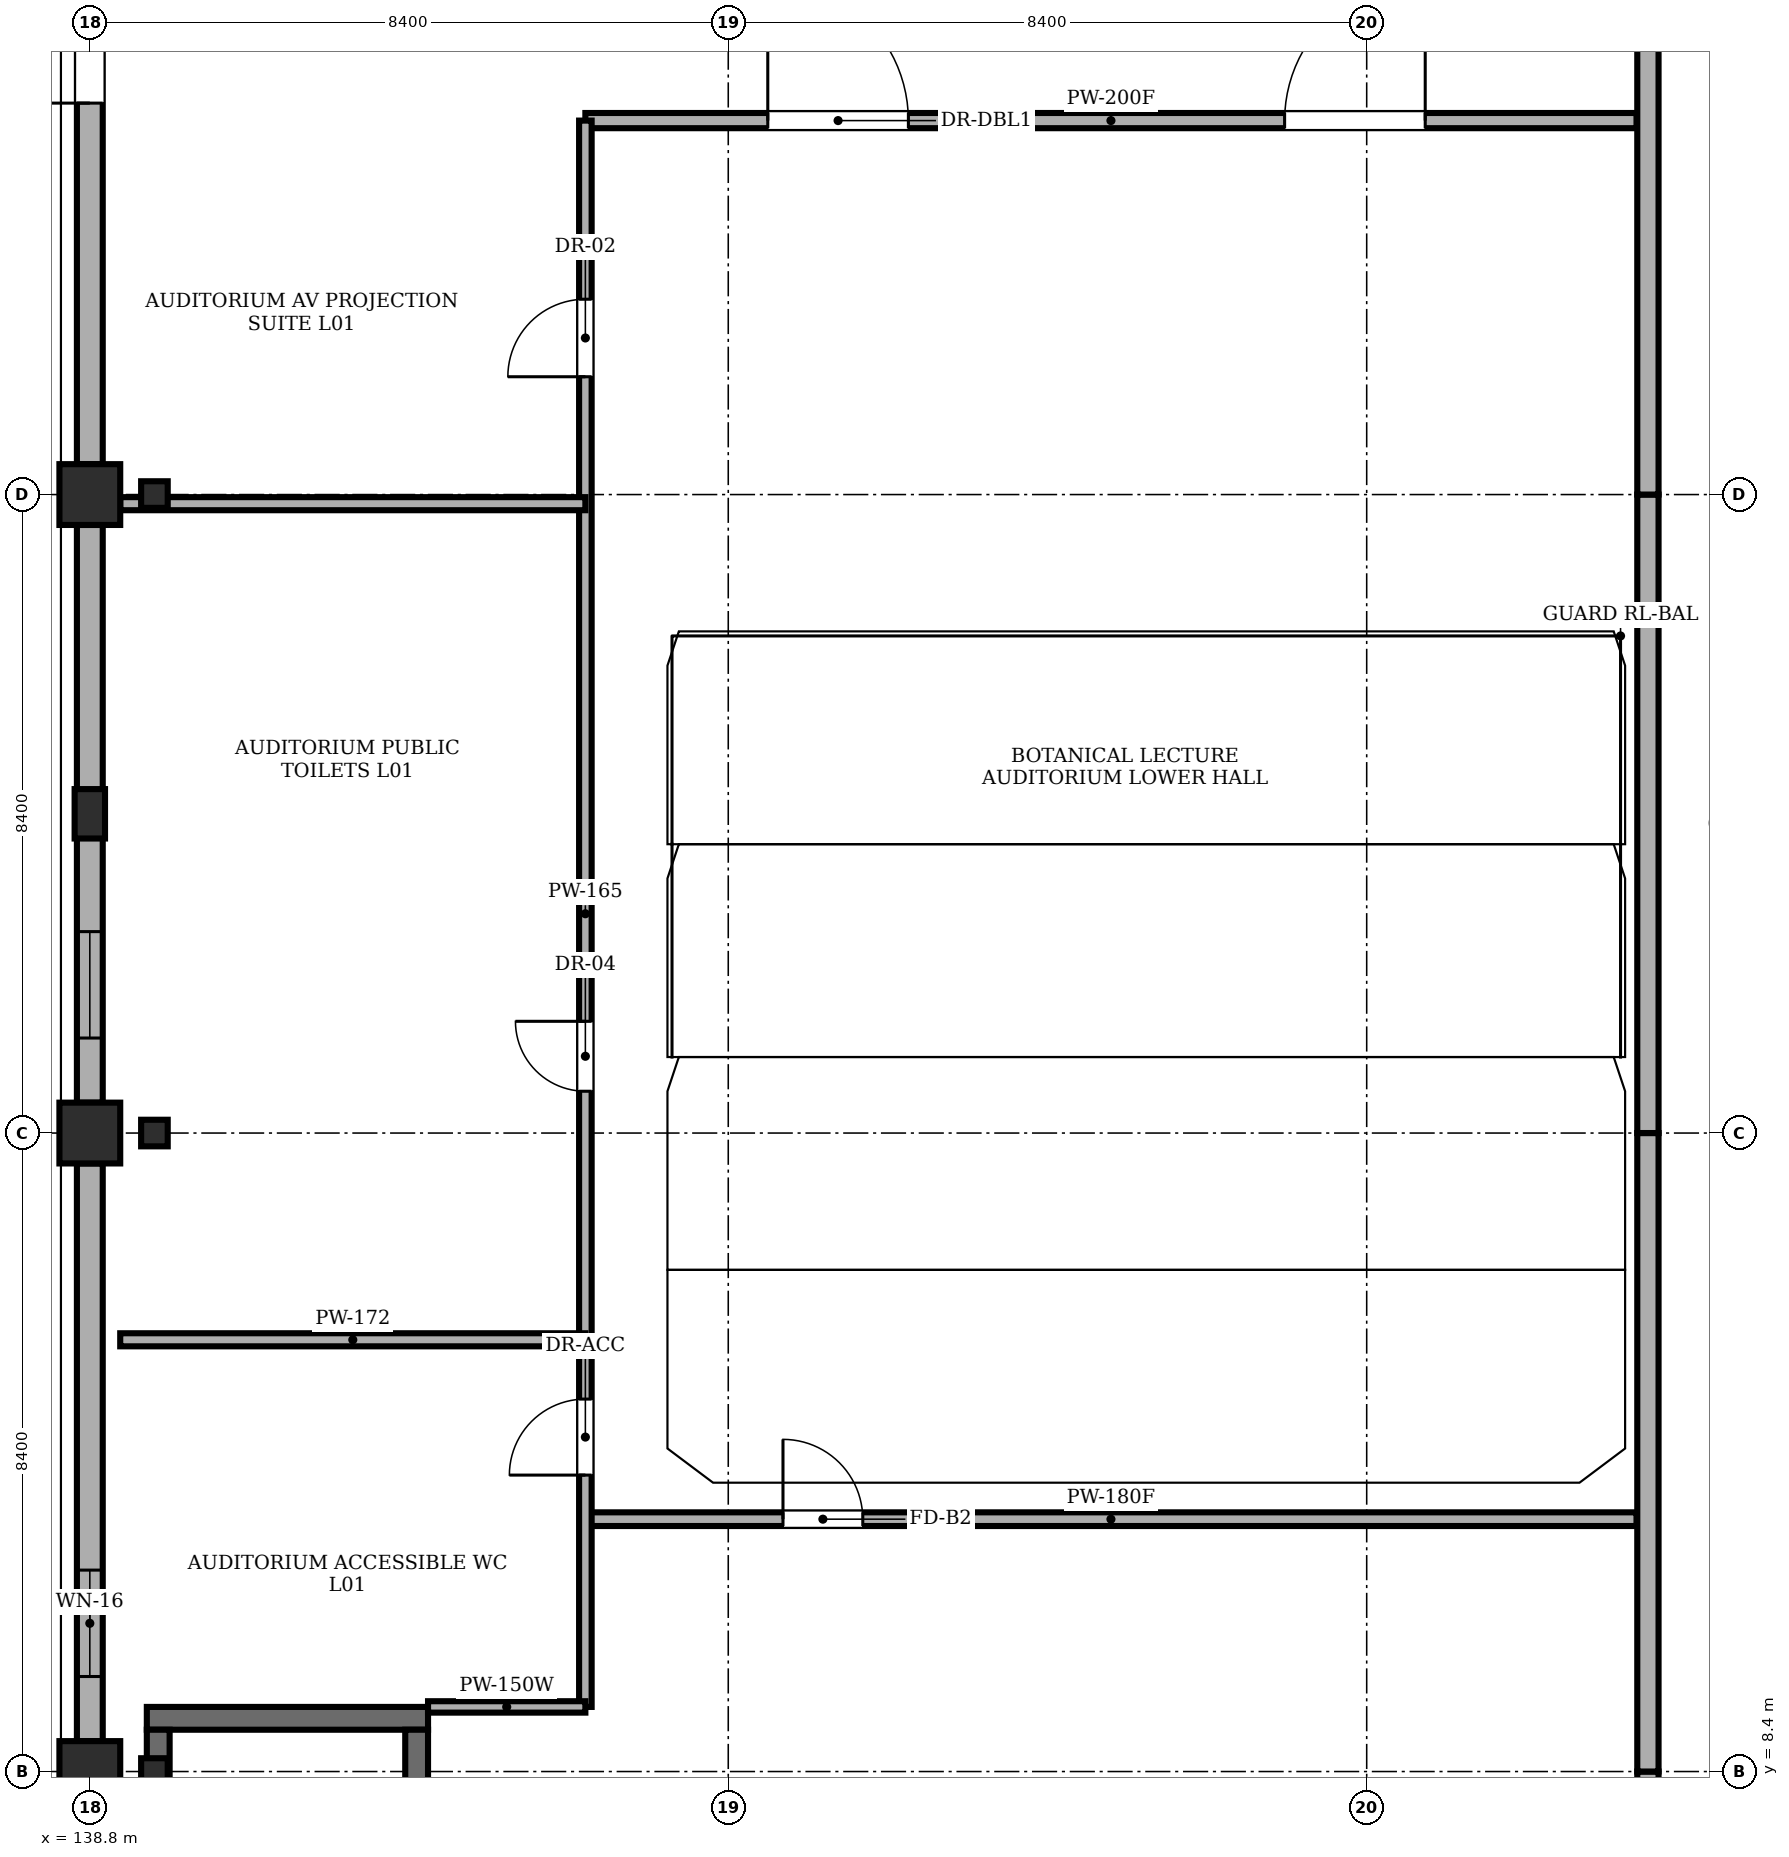
"""IFC4 building model, lengths in metres.
Left out: names, types, materials, properties, quantities, classifications, styles, units other than length and angle.
Written with IfcOpenShell. Run it as: python <this file> out.ifc"""

import sys

from ifc_helpers import new_model, si_unit, direction, frame, frame_2d, origin, origin_2d, place, context, subcontext, project, spatial, rectangle, i_section, extrude, element, fill, save


model = new_model("IFC4")
c1 = context("Model", 3, precision=1e-05, world=origin(), true_north=direction((0.0, 1.0)))
c2 = subcontext(c1, "Body", "Model", "MODEL_VIEW")
j1 = project(units=[si_unit("LENGTHUNIT", "METRE"), si_unit("PLANEANGLEUNIT", "RADIAN")], contexts=[c1])
p1 = place(None, origin())
s1 = spatial("IfcSite", under=j1, at=p1, CompositionType="ELEMENT")
p2 = place(p1, origin())
s2 = spatial("IfcBuilding", under=s1, at=p2, CompositionType="ELEMENT")
p3 = place(p2, origin())
s3 = spatial("IfcBuildingStorey", under=s2, at=p3, CompositionType="ELEMENT", Elevation=0.0)
for number, where, z_axis, x_axis in (
    (1, (138.8, 8.4, 0.0), (0.0, 0.0, 1.0), (1.0, 0.0, 0.0)),
    (2, (138.8, 16.8, 0.0), (0.0, 0.0, 1.0), (1.0, 0.0, 0.0)),
    (3, (138.8, 25.2, 0.0), (0.0, 0.0, 1.0), (1.0, 0.0, 0.0)),
):
    element("IfcColumn", number, at=place(p3, frame(where, z_axis=z_axis, x_axis=x_axis)), inside=s3, PredefinedType="COLUMN", context=c2, shape_type="SweptSolid", body=[
        extrude(rectangle(XDim=0.8, YDim=0.8, at=origin_2d()), origin(), (0.0, 0.0, 1.0), 5.18),
    ])
p4 = place(p3, frame((138.8, 21.0, 0.0), z_axis=(0.0, 0.0, 1.0), x_axis=(1.0, 0.0, 0.0)))
e4 = element("IfcColumn", 4, at=p4, inside=s3, PredefinedType="PILASTER", context=c2, shape_type="SweptSolid", body=[
    extrude(rectangle(XDim=0.4, YDim=0.65, at=origin_2d()), origin(), (0.0, 0.0, 1.0), 5.18),
])
p5 = place(p3, frame((139.55, 9.1, 0.0), z_axis=(0.0, 0.0, 1.0), x_axis=(1.0, 0.0, 0.0)))
e5 = element("IfcWall", 5, at=p5, inside=s3, PredefinedType="SHEAR", context=c2, shape_type="SweptSolid", body=[
    extrude(rectangle(XDim=3.7, YDim=0.3, at=frame_2d((1.85, 0.0))), origin(), (0.0, 0.0, 1.0), 5.18),
])
p6 = place(p3, frame((139.7, 1.05, 0.0), z_axis=(0.0, 0.0, 1.0), x_axis=(0.0, 1.0, 0.0)))
e6 = element("IfcWall", 6, at=p6, inside=s3, PredefinedType="SHEAR", context=c2, shape_type="SweptSolid", body=[
    extrude(rectangle(XDim=7.9, YDim=0.3, at=frame_2d((3.95, 0.0))), origin(), (0.0, 0.0, 1.0), 5.18),
])
p7 = place(p3, frame((143.1, 1.05, 0.0), z_axis=(0.0, 0.0, 1.0), x_axis=(0.0, 1.0, 0.0)))
e7 = element("IfcWall", 7, at=p7, inside=s3, PredefinedType="SHEAR", context=c2, shape_type="SweptSolid", body=[
    extrude(rectangle(XDim=7.9, YDim=0.3, at=frame_2d((3.95, 0.0))), origin(), (0.0, 0.0, 1.0), 5.18),
])
p8 = place(p7, frame((0.22, 0.0, 0.0)))
e8 = element("IfcOpeningElement", 8, at=p8, cuts=e7, PredefinedType="OPENING", context=c2, shape_type="SweptSolid", body=[
    extrude(rectangle(XDim=1.15, YDim=2.15, at=frame_2d((0.575, 1.075))), frame((0.0, 0.16, 0.0), z_axis=(0.0, -1.0, 0.0), x_axis=(1.0, 0.0, 0.0)), (0.0, 0.0, 1.0), 0.32),
])
p9 = place(p3, frame((139.65, 8.4, 0.0), z_axis=(0.0, 0.0, 1.0), x_axis=(1.0, 0.0, 0.0)))
e9 = element("IfcColumn", 9, at=p9, inside=s3, PredefinedType="COLUMN", context=c2, shape_type="SweptSolid", body=[
    extrude(i_section(OverallWidth=0.35, OverallDepth=0.35, WebThickness=0.012, FlangeThickness=0.019, at=origin_2d()), origin(), (0.0, 0.0, 1.0), 5.18),
])
for number, where, z_axis, x_axis in (
    (10, (139.65, 16.8, 0.0), (0.0, 0.0, 1.0), (1.0, 0.0, 0.0)),
    (11, (139.65, 25.2, 0.0), (0.0, 0.0, 1.0), (1.0, 0.0, 0.0)),
):
    element("IfcColumn", number, at=place(p3, frame(where, z_axis=z_axis, x_axis=x_axis)), inside=s3, PredefinedType="COLUMN", context=c2, shape_type="SweptSolid", body=[
        extrude(i_section(OverallWidth=0.35, OverallDepth=0.35, WebThickness=0.012, FlangeThickness=0.019, at=origin_2d()), origin(), (0.0, 0.0, 1.0), 5.4),
    ])
p10 = place(p3, frame((159.3, 8.4, 0.0), z_axis=(0.0, 0.0, 1.0), x_axis=(0.0, -1.0, 0.0)))
e12 = element("IfcWall", 12, at=p10, inside=s3, PredefinedType="STANDARD", context=c2, shape_type="SweptSolid", body=[
    extrude(rectangle(XDim=7.68, YDim=0.28, at=frame_2d((3.84, 0.0))), origin(), (0.0, 0.0, 1.0), 5.18),
])
p11 = place(p3, frame((159.3, 16.8, 0.0), z_axis=(0.0, 0.0, 1.0), x_axis=(0.0, -1.0, 0.0)))
e13 = element("IfcWall", 13, at=p11, inside=s3, PredefinedType="STANDARD", context=c2, shape_type="SweptSolid", body=[
    extrude(rectangle(XDim=8.4, YDim=0.28, at=frame_2d((4.2, 0.0))), origin(), (0.0, 0.0, 1.0), 5.18),
])
p12 = place(p3, frame((159.3, 25.2, 0.0), z_axis=(0.0, 0.0, 1.0), x_axis=(0.0, -1.0, 0.0)))
e14 = element("IfcWall", 14, at=p12, inside=s3, PredefinedType="STANDARD", context=c2, shape_type="SweptSolid", body=[
    extrude(rectangle(XDim=8.4, YDim=0.28, at=frame_2d((4.2, 0.0))), origin(), (0.0, 0.0, 1.0), 5.18),
])
p13 = place(p3, frame((159.3, 33.6, 0.0), z_axis=(0.0, 0.0, 1.0), x_axis=(0.0, -1.0, 0.0)))
e15 = element("IfcWall", 15, at=p13, inside=s3, PredefinedType="STANDARD", context=c2, shape_type="SweptSolid", body=[
    extrude(rectangle(XDim=8.4, YDim=0.28, at=frame_2d((4.2, 0.0))), origin(), (0.0, 0.0, 1.0), 5.18),
])
p14 = place(p3, frame((138.8, 8.8, 0.0), z_axis=(0.0, 0.0, 1.0), x_axis=(0.0, 1.0, 0.0)))
e16 = element("IfcWall", 16, at=p14, inside=s3, PredefinedType="STANDARD", context=c2, shape_type="SweptSolid", body=[
    extrude(rectangle(XDim=7.6, YDim=0.34, at=frame_2d((3.8, 0.0))), origin(), (0.0, 0.0, 1.0), 4.43),
])
p15 = place(p14, frame((0.85, 0.0, 1.6)))
e17 = element("IfcOpeningElement", 17, at=p15, cuts=e16, PredefinedType="OPENING", context=c2, shape_type="SweptSolid", body=[
    extrude(rectangle(XDim=1.4, YDim=1.4, at=frame_2d((0.7, 0.7))), frame((0.0, 0.18, 0.0), z_axis=(0.0, -1.0, 0.0), x_axis=(1.0, 0.0, 0.0)), (0.0, 0.0, 1.0), 0.36),
])
p16 = place(p3, frame((138.8, 17.2, 0.0), z_axis=(0.0, 0.0, 1.0), x_axis=(0.0, 1.0, 0.0)))
e18 = element("IfcWall", 18, at=p16, inside=s3, PredefinedType="STANDARD", context=c2, shape_type="SweptSolid", body=[
    extrude(rectangle(XDim=7.6, YDim=0.34, at=frame_2d((3.8, 0.0))), origin(), (0.0, 0.0, 1.0), 4.43),
])
p17 = place(p16, frame((0.85, 0.0, 1.6)))
e19 = element("IfcOpeningElement", 19, at=p17, cuts=e18, PredefinedType="OPENING", context=c2, shape_type="SweptSolid", body=[
    extrude(rectangle(XDim=1.4, YDim=1.4, at=frame_2d((0.7, 0.7))), frame((0.0, 0.18, 0.0), z_axis=(0.0, -1.0, 0.0), x_axis=(1.0, 0.0, 0.0)), (0.0, 0.0, 1.0), 0.36),
])
p18 = place(p3, frame((138.8, 25.6, 0.0), z_axis=(0.0, 0.0, 1.0), x_axis=(0.0, 1.0, 0.0)))
e20 = element("IfcWall", 20, at=p18, inside=s3, PredefinedType="STANDARD", context=c2, shape_type="SweptSolid", body=[
    extrude(rectangle(XDim=7.6, YDim=0.34, at=frame_2d((3.8, 0.0))), origin(), (0.0, 0.0, 1.0), 4.43),
])
p19 = place(p18, frame((4.75, 0.0, 0.0)))
e21 = element("IfcOpeningElement", 21, at=p19, cuts=e20, PredefinedType="OPENING", context=c2, shape_type="SweptSolid", body=[
    extrude(rectangle(XDim=1.8, YDim=2.3, at=frame_2d((0.9, 1.15))), frame((0.0, 0.18, 0.0), z_axis=(0.0, -1.0, 0.0), x_axis=(1.0, 0.0, 0.0)), (0.0, 0.0, 1.0), 0.36),
])
p20 = place(p3, frame((145.32, 30.12, 0.0), z_axis=(0.0, 0.0, 1.0), x_axis=(1.0, 0.0, 0.0)))
e22 = element("IfcWall", 22, at=p20, inside=s3, PredefinedType="SOLIDWALL", context=c2, shape_type="SweptSolid", body=[
    extrude(rectangle(XDim=13.83, YDim=0.2, at=frame_2d((6.915, 0.0))), origin(), (0.0, 0.0, 1.0), 5.18),
])
p21 = place(p20, frame((2.4, 0.0, 0.0)))
e23 = element("IfcOpeningElement", 23, at=p21, cuts=e22, PredefinedType="OPENING", context=c2, shape_type="SweptSolid", body=[
    extrude(rectangle(XDim=1.85, YDim=2.25, at=frame_2d((0.925, 1.125))), frame((0.0, 0.11, 0.0), z_axis=(0.0, -1.0, 0.0), x_axis=(1.0, 0.0, 0.0)), (0.0, 0.0, 1.0), 0.22),
])
p22 = place(p20, frame((9.2, 0.0, 0.0)))
e24 = element("IfcOpeningElement", 24, at=p22, cuts=e22, PredefinedType="OPENING", context=c2, shape_type="SweptSolid", body=[
    extrude(rectangle(XDim=1.85, YDim=2.25, at=frame_2d((0.925, 1.125))), frame((0.0, 0.11, 0.0), z_axis=(0.0, -1.0, 0.0), x_axis=(1.0, 0.0, 0.0)), (0.0, 0.0, 1.0), 0.22),
])
p23 = place(p3, frame((145.32, 11.72, 0.0), z_axis=(0.0, 0.0, 1.0), x_axis=(1.0, 0.0, 0.0)))
e25 = element("IfcWall", 25, at=p23, inside=s3, PredefinedType="STANDARD", context=c2, shape_type="SweptSolid", body=[
    extrude(rectangle(XDim=13.83, YDim=0.18, at=frame_2d((6.915, 0.0))), origin(), (0.0, 0.0, 1.0), 5.18),
])
p24 = place(p23, frame((2.6, 0.0, 0.0)))
e26 = element("IfcOpeningElement", 26, at=p24, cuts=e25, PredefinedType="OPENING", context=c2, shape_type="SweptSolid", body=[
    extrude(rectangle(XDim=1.05, YDim=2.15, at=frame_2d((0.525, 1.075))), frame((0.0, 0.1, 0.0), z_axis=(0.0, -1.0, 0.0), x_axis=(1.0, 0.0, 0.0)), (0.0, 0.0, 1.0), 0.2),
])
p25 = place(p3, frame((145.32, 9.25, 0.0), z_axis=(0.0, 0.0, 1.0), x_axis=(0.0, 1.0, 0.0)))
e27 = element("IfcWall", 27, at=p25, inside=s3, PredefinedType="PARTITIONING", context=c2, shape_type="SweptSolid", body=[
    extrude(rectangle(XDim=20.87, YDim=0.165, at=frame_2d((10.435, 0.0))), origin(), (0.0, 0.0, 1.0), 5.18),
])
p26 = place(p25, frame((3.05, 0.0, 0.0)))
e28 = element("IfcOpeningElement", 28, at=p26, cuts=e27, PredefinedType="OPENING", context=c2, shape_type="SweptSolid", body=[
    extrude(rectangle(XDim=1.0, YDim=2.12, at=frame_2d((0.5, 1.06))), frame((0.0, 0.093, 0.0), z_axis=(0.0, -1.0, 0.0), x_axis=(1.0, 0.0, 0.0)), (0.0, 0.0, 1.0), 0.185),
])
p27 = place(p25, frame((8.1, 0.0, 0.0)))
e29 = element("IfcOpeningElement", 29, at=p27, cuts=e27, PredefinedType="OPENING", context=c2, shape_type="SweptSolid", body=[
    extrude(rectangle(XDim=0.92, YDim=2.1, at=frame_2d((0.46, 1.05))), frame((0.0, 0.093, 0.0), z_axis=(0.0, -1.0, 0.0), x_axis=(1.0, 0.0, 0.0)), (0.0, 0.0, 1.0), 0.185),
])
p28 = place(p25, frame((17.5, 0.0, 0.0)))
e30 = element("IfcOpeningElement", 30, at=p28, cuts=e27, PredefinedType="OPENING", context=c2, shape_type="SweptSolid", body=[
    extrude(rectangle(XDim=1.02, YDim=2.15, at=frame_2d((0.51, 1.075))), frame((0.0, 0.093, 0.0), z_axis=(0.0, -1.0, 0.0), x_axis=(1.0, 0.0, 0.0)), (0.0, 0.0, 1.0), 0.185),
])
p29 = place(p3, frame((143.25, 9.25, 0.0), z_axis=(0.0, 0.0, 1.0), x_axis=(1.0, 0.0, 0.0)))
e31 = element("IfcWall", 31, at=p29, inside=s3, PredefinedType="PARTITIONING", context=c2, shape_type="SweptSolid", body=[
    extrude(rectangle(XDim=2.07, YDim=0.15, at=frame_2d((1.035, 0.0))), origin(), (0.0, 0.0, 1.0), 5.18),
])
for number, where, z_axis, x_axis in (
    (32, (139.2, 14.08, 0.0), (0.0, 0.0, 1.0), (1.0, 0.0, 0.0)),
    (33, (139.2, 25.08, 0.0), (0.0, 0.0, 1.0), (1.0, 0.0, 0.0)),
):
    element("IfcWall", number, at=place(p3, frame(where, z_axis=z_axis, x_axis=x_axis)), inside=s3, PredefinedType="PARTITIONING", context=c2, shape_type="SweptSolid", body=[
        extrude(rectangle(XDim=6.12, YDim=0.172, at=frame_2d((3.06, 0.0))), origin(), (0.0, 0.0, 1.0), 5.18),
    ])
p30 = place(p15, origin())
e34 = element("IfcWindow", 34, at=p30, inside=s3, PartitioningType="SINGLE_PANEL", PredefinedType="WINDOW", context=c2, shape_type="SweptSolid", body=[
    extrude(rectangle(XDim=1.4, YDim=1.4, at=frame_2d((0.7, 0.7))), frame((0.0, 0.03, 0.0), z_axis=(0.0, -1.0, 0.0), x_axis=(1.0, 0.0, 0.0)), (0.0, 0.0, 1.0), 0.06),
])
fill(e17, e34)
p31 = place(p17, origin())
e35 = element("IfcWindow", 35, at=p31, inside=s3, PartitioningType="SINGLE_PANEL", PredefinedType="WINDOW", context=c2, shape_type="SweptSolid", body=[
    extrude(rectangle(XDim=1.4, YDim=1.4, at=frame_2d((0.7, 0.7))), frame((0.0, 0.03, 0.0), z_axis=(0.0, -1.0, 0.0), x_axis=(1.0, 0.0, 0.0)), (0.0, 0.0, 1.0), 0.06),
])
fill(e19, e35)
p32 = place(p19, origin())
e36 = element("IfcDoor", 36, at=p32, inside=s3, OperationType="SINGLE_SWING_LEFT", PredefinedType="DOOR", context=c2, shape_type="SweptSolid", body=[
    extrude(rectangle(XDim=1.8, YDim=2.3, at=frame_2d((0.9, 1.15))), frame((0.0, 0.025, 0.0), z_axis=(0.0, -1.0, 0.0), x_axis=(1.0, 0.0, 0.0)), (0.0, 0.0, 1.0), 0.05),
])
fill(e21, e36)
p33 = place(p21, origin())
e37 = element("IfcDoor", 37, at=p33, inside=s3, OperationType="SINGLE_SWING_LEFT", PredefinedType="DOOR", context=c2, shape_type="SweptSolid", body=[
    extrude(rectangle(XDim=1.85, YDim=2.25, at=frame_2d((0.925, 1.125))), frame((0.0, 0.025, 0.0), z_axis=(0.0, -1.0, 0.0), x_axis=(1.0, 0.0, 0.0)), (0.0, 0.0, 1.0), 0.05),
])
fill(e23, e37)
p34 = place(p22, origin())
e38 = element("IfcDoor", 38, at=p34, inside=s3, OperationType="SINGLE_SWING_RIGHT", PredefinedType="DOOR", context=c2, shape_type="SweptSolid", body=[
    extrude(rectangle(XDim=1.85, YDim=2.25, at=frame_2d((0.925, 1.125))), frame((0.0, 0.025, 0.0), z_axis=(0.0, -1.0, 0.0), x_axis=(1.0, 0.0, 0.0)), (0.0, 0.0, 1.0), 0.05),
])
fill(e24, e38)
p35 = place(p24, origin())
e39 = element("IfcDoor", 39, at=p35, inside=s3, OperationType="SINGLE_SWING_LEFT", PredefinedType="DOOR", context=c2, shape_type="SweptSolid", body=[
    extrude(rectangle(XDim=1.05, YDim=2.15, at=frame_2d((0.525, 1.075))), frame((0.0, 0.025, 0.0), z_axis=(0.0, -1.0, 0.0), x_axis=(1.0, 0.0, 0.0)), (0.0, 0.0, 1.0), 0.05),
])
fill(e26, e39)
p36 = place(p26, origin())
e40 = element("IfcDoor", 40, at=p36, inside=s3, OperationType="SINGLE_SWING_LEFT", PredefinedType="DOOR", context=c2, shape_type="SweptSolid", body=[
    extrude(rectangle(XDim=1.0, YDim=2.12, at=frame_2d((0.5, 1.06))), frame((0.0, 0.025, 0.0), z_axis=(0.0, -1.0, 0.0), x_axis=(1.0, 0.0, 0.0)), (0.0, 0.0, 1.0), 0.05),
])
fill(e28, e40)
p37 = place(p27, origin())
e41 = element("IfcDoor", 41, at=p37, inside=s3, OperationType="SINGLE_SWING_RIGHT", PredefinedType="DOOR", context=c2, shape_type="SweptSolid", body=[
    extrude(rectangle(XDim=0.92, YDim=2.1, at=frame_2d((0.46, 1.05))), frame((0.0, 0.025, 0.0), z_axis=(0.0, -1.0, 0.0), x_axis=(1.0, 0.0, 0.0)), (0.0, 0.0, 1.0), 0.05),
])
fill(e29, e41)
p38 = place(p28, origin())
e42 = element("IfcDoor", 42, at=p38, inside=s3, OperationType="SINGLE_SWING_LEFT", PredefinedType="DOOR", context=c2, shape_type="SweptSolid", body=[
    extrude(rectangle(XDim=1.02, YDim=2.15, at=frame_2d((0.51, 1.075))), frame((0.0, 0.025, 0.0), z_axis=(0.0, -1.0, 0.0), x_axis=(1.0, 0.0, 0.0)), (0.0, 0.0, 1.0), 0.05),
])
fill(e30, e42)
save(model, sys.argv[1])
